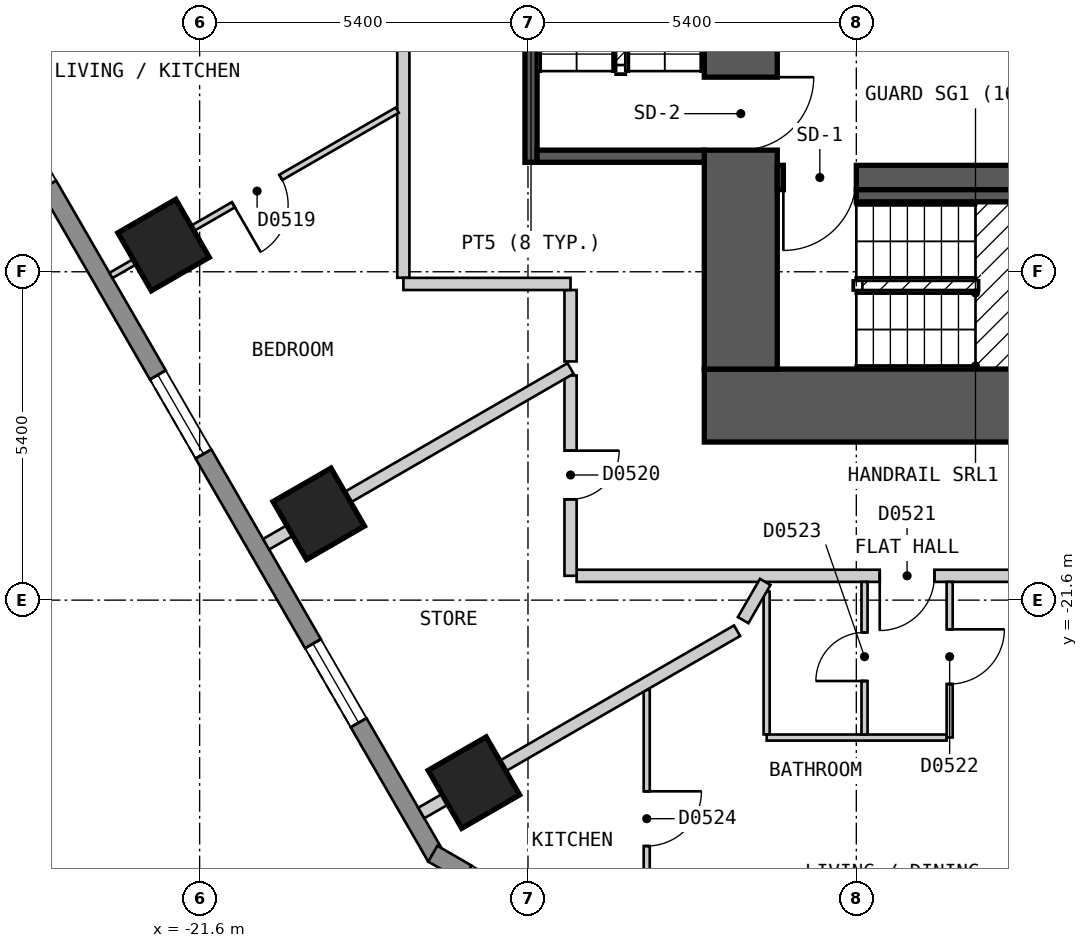
"""IFC4 building model, lengths in metres.
Left out: names, types, materials, properties, quantities, classifications, styles, units other than length and angle.
Written with IfcOpenShell. Run it as: python <this file> out.ifc"""

import sys

from ifc_helpers import new_model, si_unit, direction, frame, frame_2d, origin, origin_2d, place, context, subcontext, project, spatial, polyline, rectangle, outline, extrude, element, fill, save


model = new_model("IFC4")
c1 = context("Model", 3, precision=1e-05, world=origin(), true_north=direction((0.0, 1.0)))
c2 = subcontext(c1, "Body", "Model", "MODEL_VIEW")
j1 = project(units=[si_unit("LENGTHUNIT", "METRE"), si_unit("PLANEANGLEUNIT", "RADIAN")], contexts=[c1])
p1 = place(None, origin())
s1 = spatial("IfcSite", under=j1, at=p1, CompositionType="ELEMENT")
p2 = place(p1, origin())
s2 = spatial("IfcBuilding", under=s1, at=p2, CompositionType="ELEMENT")
p3 = place(p2, frame((0.0, 0.0, 56.4)))
s3 = spatial("IfcBuildingStorey", under=s2, at=p3, CompositionType="ELEMENT", Elevation=56.4)
for number, where, z_axis, x_axis in (
    (1, (-22.193, -15.761, 0.0), (0.0, 0.0, 1.0), (0.5, -0.866, 0.0)),
    (2, (-19.641, -20.181, 0.0), (0.0, 0.0, 1.0), (0.5, -0.866, 0.0)),
    (3, (-17.089, -24.601, 0.0), (0.0, 0.0, 1.0), (0.5, -0.866, 0.0)),
):
    element("IfcColumn", number, at=place(p3, frame(where, z_axis=z_axis, x_axis=x_axis)), inside=s3, PredefinedType="COLUMN", context=c2, shape_type="SweptSolid", body=[
        extrude(rectangle(XDim=1.1, YDim=1.1, at=origin_2d()), origin(), (0.0, 0.0, 1.0), 3.0),
    ])
p4 = place(p3, frame((-13.3, -18.4, 0.0), z_axis=(0.0, 0.0, 1.0), x_axis=(1.0, 0.0, 0.0)))
e4 = element("IfcWall", 4, at=p4, inside=s3, PredefinedType="SHEAR", context=c2, shape_type="SweptSolid", body=[
    extrude(rectangle(XDim=26.6, YDim=1.2, at=frame_2d((13.3, 0.0))), origin(), (0.0, 0.0, 1.0), 2.7),
])
p5 = place(p3, frame((-12.7, -17.8, 0.0), z_axis=(0.0, 0.0, 1.0), x_axis=(0.0, 1.0, 0.0)))
e5 = element("IfcWall", 5, at=p5, inside=s3, PredefinedType="SHEAR", context=c2, shape_type="SweptSolid", body=[
    extrude(rectangle(XDim=11.6, YDim=1.2, at=frame_2d((5.8, 0.0))), origin(), (0.0, 0.0, 1.0), 2.7),
])
p6 = place(p5, frame((3.6, 0.0, 0.0)))
e6 = element("IfcOpeningElement", 6, at=p6, cuts=e5, PredefinedType="OPENING", context=c2, shape_type="SweptSolid", body=[
    extrude(rectangle(XDim=1.2, YDim=2.1, at=frame_2d((0.6, 1.05))), frame((0.0, 0.61, 0.0), z_axis=(0.0, -1.0, 0.0), x_axis=(1.0, 0.0, 0.0)), (0.0, 0.0, 1.0), 1.22),
])
p7 = place(p3, frame((-12.1, -14.65, 0.0), z_axis=(0.0, 0.0, 1.0), x_axis=(1.0, 0.0, 0.0)))
e7 = element("IfcWall", 7, at=p7, inside=s3, PredefinedType="SHEAR", context=c2, shape_type="SweptSolid", body=[
    extrude(rectangle(XDim=24.2, YDim=0.4, at=frame_2d((12.1, 0.0))), origin(), (0.0, 0.0, 1.0), 2.7),
])
p8 = place(p7, frame((1.3, 0.0, 0.0), z_axis=(0.0, 0.0, 1.0), x_axis=(-1.0, 0.0, 0.0)))
e8 = element("IfcOpeningElement", 8, at=p8, cuts=e7, PredefinedType="OPENING", context=c2, shape_type="SweptSolid", body=[
    extrude(rectangle(XDim=1.2, YDim=2.1, at=frame_2d((0.6, 1.05))), frame((0.0, 0.21, 0.0), z_axis=(0.0, -1.0, 0.0), x_axis=(1.0, 0.0, 0.0)), (0.0, 0.0, 1.0), 0.42),
])
p9 = place(p7, frame((24.15, 0.0, 0.0), z_axis=(0.0, 0.0, 1.0), x_axis=(-1.0, 0.0, 0.0)))
e9 = element("IfcOpeningElement", 9, at=p9, cuts=e7, PredefinedType="OPENING", context=c2, shape_type="SweptSolid", body=[
    extrude(rectangle(XDim=1.2, YDim=2.1, at=frame_2d((0.6, 1.05))), frame((0.0, 0.21, 0.0), z_axis=(0.0, -1.0, 0.0), x_axis=(1.0, 0.0, 0.0)), (0.0, 0.0, 1.0), 0.42),
])
p10 = place(p7, frame((16.6, 0.0, 0.0), z_axis=(0.0, 0.0, 1.0), x_axis=(-1.0, 0.0, 0.0)))
e10 = element("IfcOpeningElement", 10, at=p10, cuts=e7, PredefinedType="OPENING", context=c2, shape_type="SweptSolid", body=[
    extrude(rectangle(XDim=1.0, YDim=2.1, at=frame_2d((0.5, 1.05))), frame((0.0, 0.21, 0.0), z_axis=(0.0, -1.0, 0.0), x_axis=(1.0, 0.0, 0.0)), (0.0, 0.0, 1.0), 0.42),
])
p11 = place(p7, frame((18.35, 0.0, 0.0), z_axis=(0.0, 0.0, 1.0), x_axis=(-1.0, 0.0, 0.0)))
e11 = element("IfcOpeningElement", 11, at=p11, cuts=e7, PredefinedType="OPENING", context=c2, shape_type="SweptSolid", body=[
    extrude(rectangle(XDim=0.9, YDim=2.1, at=frame_2d((0.45, 1.05))), frame((0.0, 0.21, 0.0), z_axis=(0.0, -1.0, 0.0), x_axis=(1.0, 0.0, 0.0)), (0.0, 0.0, 1.0), 0.42),
])
p12 = place(p3, frame((-31.22, -2.425, 0.0), z_axis=(0.0, 0.0, 1.0), x_axis=(0.500001938803, -0.866024284413, 0.0)))
e12 = element("IfcWall", 12, at=p12, inside=s3, PredefinedType="SOLIDWALL", context=c2, shape_type="SweptSolid", body=[
    extrude(outline(polyline([(0.0, -0.15), (27.02, -0.15), (26.94, 0.15), (0.08, 0.15), (0.0, -0.15)])), origin(), (0.0, 0.0, 1.0), 2.7),
])
p13 = place(p12, frame((2.553, 0.0, 0.15)))
e13 = element("IfcOpeningElement", 13, at=p13, cuts=e12, PredefinedType="OPENING", context=c2, shape_type="SweptSolid", body=[
    extrude(rectangle(XDim=1.5, YDim=2.1, at=frame_2d((0.75, 1.05))), frame((0.0, 0.16, 0.0), z_axis=(0.0, -1.0, 0.0), x_axis=(1.0, 0.0, 0.0)), (0.0, 0.0, 1.0), 0.32),
])
p14 = place(p12, frame((7.657, 0.0, 0.15)))
e14 = element("IfcOpeningElement", 14, at=p14, cuts=e12, PredefinedType="OPENING", context=c2, shape_type="SweptSolid", body=[
    extrude(rectangle(XDim=1.5, YDim=2.1, at=frame_2d((0.75, 1.05))), frame((0.0, 0.16, 0.0), z_axis=(0.0, -1.0, 0.0), x_axis=(1.0, 0.0, 0.0)), (0.0, 0.0, 1.0), 0.32),
])
p15 = place(p12, frame((12.761, 0.0, 0.15)))
e15 = element("IfcOpeningElement", 15, at=p15, cuts=e12, PredefinedType="OPENING", context=c2, shape_type="SweptSolid", body=[
    extrude(rectangle(XDim=1.5, YDim=2.1, at=frame_2d((0.75, 1.05))), frame((0.0, 0.16, 0.0), z_axis=(0.0, -1.0, 0.0), x_axis=(1.0, 0.0, 0.0)), (0.0, 0.0, 1.0), 0.32),
])
p16 = place(p12, frame((17.865, 0.0, 0.15)))
e16 = element("IfcOpeningElement", 16, at=p16, cuts=e12, PredefinedType="OPENING", context=c2, shape_type="SweptSolid", body=[
    extrude(rectangle(XDim=1.5, YDim=2.1, at=frame_2d((0.75, 1.05))), frame((0.0, 0.16, 0.0), z_axis=(0.0, -1.0, 0.0), x_axis=(1.0, 0.0, 0.0)), (0.0, 0.0, 1.0), 0.32),
])
p17 = place(p12, frame((22.969, 0.0, 0.15)))
e17 = element("IfcOpeningElement", 17, at=p17, cuts=e12, PredefinedType="OPENING", context=c2, shape_type="SweptSolid", body=[
    extrude(rectangle(XDim=1.5, YDim=2.1, at=frame_2d((0.75, 1.05))), frame((0.0, 0.16, 0.0), z_axis=(0.0, -1.0, 0.0), x_axis=(1.0, 0.0, 0.0)), (0.0, 0.0, 1.0), 0.32),
])
p18 = place(p3, frame((-17.765, -25.77, 0.0), z_axis=(0.0, 0.0, 1.0), x_axis=(0.866010750942, -0.50002537861, 0.0)))
e18 = element("IfcWall", 18, at=p18, inside=s3, PredefinedType="SOLIDWALL", context=c2, shape_type="SweptSolid", body=[
    extrude(outline(polyline([(0.0, -0.15), (5.0, -0.15), (4.919, 0.15), (0.08, 0.15), (0.0, -0.15)])), origin(), (0.0, 0.0, 1.0), 2.7),
])
p19 = place(p18, frame((0.65, 0.0, 0.15)))
e19 = element("IfcOpeningElement", 19, at=p19, cuts=e18, PredefinedType="OPENING", context=c2, shape_type="SweptSolid", body=[
    extrude(rectangle(XDim=1.2, YDim=2.1, at=frame_2d((0.6, 1.05))), frame((0.0, 0.16, 0.0), z_axis=(0.0, -1.0, 0.0), x_axis=(1.0, 0.0, 0.0)), (0.0, 0.0, 1.0), 0.32),
])
p20 = place(p3, frame((-15.5, -16.5, 0.0), z_axis=(0.0, 0.0, 1.0), x_axis=(0.0, -1.0, 0.0)))
e20 = element("IfcWall", 20, at=p20, inside=s3, PredefinedType="PARTITIONING", context=c2, shape_type="SweptSolid", body=[
    extrude(rectangle(XDim=1.175, YDim=0.2, at=frame_2d((0.587, 0.0))), origin(), (0.0, 0.0, 1.0), 2.7),
])
p21 = place(p3, frame((-18.25, -11.507, 0.0), z_axis=(0.0, 0.0, 1.0), x_axis=(0.0, -1.0, 0.0)))
e21 = element("IfcWall", 21, at=p21, inside=s3, PredefinedType="PARTITIONING", context=c2, shape_type="SweptSolid", body=[
    extrude(rectangle(XDim=4.792, YDim=0.2, at=frame_2d((2.396, 0.0))), origin(), (0.0, 0.0, 1.0), 2.7),
])
p22 = place(p3, frame((-18.249, -16.4, 0.0), z_axis=(0.0, 0.0, 1.0), x_axis=(1.0, 0.0, 0.0)))
e22 = element("IfcWall", 22, at=p22, inside=s3, PredefinedType="PARTITIONING", context=c2, shape_type="SweptSolid", body=[
    extrude(rectangle(XDim=2.749, YDim=0.2, at=frame_2d((1.375, 0.0))), origin(), (0.0, 0.0, 1.0), 2.7),
])
p23 = place(p3, frame((-15.4, -21.2, 0.0), z_axis=(0.0, 0.0, 1.0), x_axis=(1.0, 0.0, 0.0)))
e23 = element("IfcWall", 23, at=p23, inside=s3, PredefinedType="PARTITIONING", context=c2, shape_type="SweptSolid", body=[
    extrude(rectangle(XDim=30.799, YDim=0.2, at=frame_2d((15.399, 0.0))), origin(), (0.0, 0.0, 1.0), 2.7),
])
p24 = place(p23, frame((4.985, 0.0, 0.0)))
e24 = element("IfcOpeningElement", 24, at=p24, cuts=e23, PredefinedType="OPENING", context=c2, shape_type="SweptSolid", body=[
    extrude(rectangle(XDim=0.9, YDim=2.1, at=frame_2d((0.45, 1.05))), frame((0.0, 0.11, 0.0), z_axis=(0.0, -1.0, 0.0), x_axis=(1.0, 0.0, 0.0)), (0.0, 0.0, 1.0), 0.22),
])
p25 = place(p23, frame((20.005, 0.0, 0.0)))
e25 = element("IfcOpeningElement", 25, at=p25, cuts=e23, PredefinedType="OPENING", context=c2, shape_type="SweptSolid", body=[
    extrude(rectangle(XDim=1.0, YDim=2.1, at=frame_2d((0.5, 1.05))), frame((0.0, 0.11, 0.0), z_axis=(0.0, -1.0, 0.0), x_axis=(1.0, 0.0, 0.0)), (0.0, 0.0, 1.0), 0.22),
])
p26 = place(p23, frame((24.916, 0.0, 0.0)))
e26 = element("IfcOpeningElement", 26, at=p26, cuts=e23, PredefinedType="OPENING", context=c2, shape_type="SweptSolid", body=[
    extrude(rectangle(XDim=0.9, YDim=2.1, at=frame_2d((0.45, 1.05))), frame((0.0, 0.11, 0.0), z_axis=(0.0, -1.0, 0.0), x_axis=(1.0, 0.0, 0.0)), (0.0, 0.0, 1.0), 0.22),
])
p27 = place(p3, frame((-15.5, -21.2, 0.0), z_axis=(0.0, 0.0, 1.0), x_axis=(0.0, 1.0, 0.0)))
e27 = element("IfcWall", 27, at=p27, inside=s3, PredefinedType="PARTITIONING", context=c2, shape_type="SweptSolid", body=[
    extrude(rectangle(XDim=3.294, YDim=0.2, at=frame_2d((1.647, 0.0))), origin(), (0.0, 0.0, 1.0), 2.7),
])
p28 = place(p27, frame((1.258, 0.0, 0.0)))
e28 = element("IfcOpeningElement", 28, at=p28, cuts=e27, PredefinedType="OPENING", context=c2, shape_type="SweptSolid", body=[
    extrude(rectangle(XDim=0.8, YDim=2.1, at=frame_2d((0.4, 1.05))), frame((0.0, 0.11, 0.0), z_axis=(0.0, -1.0, 0.0), x_axis=(1.0, 0.0, 0.0)), (0.0, 0.0, 1.0), 0.22),
])
p29 = place(p3, frame((-12.275, -21.46, 0.0), z_axis=(0.0, 0.0, 1.0), x_axis=(0.0, -1.0, 0.0)))
e29 = element("IfcWall", 29, at=p29, inside=s3, PredefinedType="PARTITIONING", context=c2, shape_type="SweptSolid", body=[
    extrude(rectangle(XDim=2.349, YDim=0.1, at=frame_2d((1.175, 0.0))), origin(), (0.0, 0.0, 1.0), 2.7),
])
p30 = place(p3, frame((-12.274, -23.86, 0.0), z_axis=(0.0, 0.0, 1.0), x_axis=(1.0, 0.0, 0.0)))
e30 = element("IfcWall", 30, at=p30, inside=s3, PredefinedType="PARTITIONING", context=c2, shape_type="SweptSolid", body=[
    extrude(rectangle(XDim=2.958, YDim=0.1, at=frame_2d((1.479, 0.0))), origin(), (0.0, 0.0, 1.0), 2.7),
])
p31 = place(p3, frame((-9.265, -23.859, 0.0), z_axis=(0.0, 0.0, 1.0), x_axis=(0.0, 1.0, 0.0)))
e31 = element("IfcWall", 31, at=p31, inside=s3, PredefinedType="PARTITIONING", context=c2, shape_type="SweptSolid", body=[
    extrude(rectangle(XDim=2.559, YDim=0.1, at=frame_2d((1.279, 0.0))), origin(), (0.0, 0.0, 1.0), 2.7),
])
p32 = place(p31, frame((0.879, 0.0, 0.0)))
e32 = element("IfcOpeningElement", 32, at=p32, cuts=e31, PredefinedType="OPENING", context=c2, shape_type="SweptSolid", body=[
    extrude(rectangle(XDim=0.9, YDim=2.1, at=frame_2d((0.45, 1.05))), frame((0.0, 0.06, 0.0), z_axis=(0.0, -1.0, 0.0), x_axis=(1.0, 0.0, 0.0)), (0.0, 0.0, 1.0), 0.12),
])
p33 = place(p3, frame((-10.665, -23.81, 0.0), z_axis=(0.0, 0.0, 1.0), x_axis=(0.0, 1.0, 0.0)))
e33 = element("IfcWall", 33, at=p33, inside=s3, PredefinedType="PARTITIONING", context=c2, shape_type="SweptSolid", body=[
    extrude(rectangle(XDim=2.51, YDim=0.1, at=frame_2d((1.255, 0.0))), origin(), (0.0, 0.0, 1.0), 2.7),
])
p34 = place(p33, frame((0.88, 0.0, 0.0)))
e34 = element("IfcOpeningElement", 34, at=p34, cuts=e33, PredefinedType="OPENING", context=c2, shape_type="SweptSolid", body=[
    extrude(rectangle(XDim=0.8, YDim=2.1, at=frame_2d((0.4, 1.05))), frame((0.0, 0.06, 0.0), z_axis=(0.0, -1.0, 0.0), x_axis=(1.0, 0.0, 0.0)), (0.0, 0.0, 1.0), 0.12),
])
p35 = place(p3, frame((-14.247, -27.628, 0.0), z_axis=(0.0, 0.0, 1.0), x_axis=(0.0, 1.0, 0.0)))
e35 = element("IfcWall", 35, at=p35, inside=s3, PredefinedType="PARTITIONING", context=c2, shape_type="SweptSolid", body=[
    extrude(rectangle(XDim=4.552, YDim=0.1, at=frame_2d((2.276, 0.0))), origin(), (0.0, 0.0, 1.0), 2.7),
])
p36 = place(p35, frame((1.984, 0.0, 0.0)))
e36 = element("IfcOpeningElement", 36, at=p36, cuts=e35, PredefinedType="OPENING", context=c2, shape_type="SweptSolid", body=[
    extrude(rectangle(XDim=0.9, YDim=2.1, at=frame_2d((0.45, 1.05))), frame((0.0, 0.06, 0.0), z_axis=(0.0, -1.0, 0.0), x_axis=(1.0, 0.0, 0.0)), (0.0, 0.0, 1.0), 0.12),
])
p37 = place(p3, frame((-23.059, -16.261, 0.0), z_axis=(0.0, 0.0, 1.0), x_axis=(0.866004639177, 0.500035963631, 0.0)))
e37 = element("IfcWall", 37, at=p37, inside=s3, PredefinedType="PARTITIONING", context=c2, shape_type="SweptSolid", body=[
    extrude(rectangle(XDim=5.438, YDim=0.1, at=frame_2d((2.719, 0.0))), origin(), (0.0, 0.0, 1.0), 2.7),
])
p38 = place(p37, frame((2.326, 0.0, 0.0)))
e38 = element("IfcOpeningElement", 38, at=p38, cuts=e37, PredefinedType="OPENING", context=c2, shape_type="SweptSolid", body=[
    extrude(rectangle(XDim=0.9, YDim=2.1, at=frame_2d((0.45, 1.05))), frame((0.0, 0.06, 0.0), z_axis=(0.0, -1.0, 0.0), x_axis=(1.0, 0.0, 0.0)), (0.0, 0.0, 1.0), 0.12),
])
p39 = place(p3, frame((-12.661, -21.929, 0.0), z_axis=(0.0, 0.0, 1.0), x_axis=(0.499683639304, 0.866207977689, 0.0)))
e39 = element("IfcWall", 39, at=p39, inside=s3, PredefinedType="PARTITIONING", context=c2, shape_type="SweptSolid", body=[
    extrude(rectangle(XDim=0.726, YDim=0.2, at=frame_2d((0.363, 0.0))), origin(), (0.0, 0.0, 1.0), 2.7),
])
p40 = place(p3, frame((-20.507, -20.681, 0.0), z_axis=(0.0, 0.0, 1.0), x_axis=(0.86602314875, 0.500003905814, 0.0)))
e40 = element("IfcWall", 40, at=p40, inside=s3, PredefinedType="PARTITIONING", context=c2, shape_type="SweptSolid", body=[
    extrude(rectangle(XDim=5.782, YDim=0.2, at=frame_2d((2.891, 0.0))), origin(), (0.0, 0.0, 1.0), 2.7),
])
p41 = place(p3, frame((-17.955, -25.101, 0.0), z_axis=(0.0, 0.0, 1.0), x_axis=(0.866080519133, 0.499904525262, 0.0)))
e41 = element("IfcWall", 41, at=p41, inside=s3, PredefinedType="PARTITIONING", context=c2, shape_type="SweptSolid", body=[
    extrude(rectangle(XDim=5.997, YDim=0.2, at=frame_2d((2.999, 0.0))), origin(), (0.0, 0.0, 1.0), 2.7),
])
p42 = place(p3, frame((-16.15, -14.4, 0.0), z_axis=(0.0, 0.0, 1.0), x_axis=(0.0, 1.0, 0.0)))
e42 = element("IfcWall", 42, at=p42, inside=s3, PredefinedType="SOLIDWALL", context=c2, shape_type="SweptSolid", body=[
    extrude(rectangle(XDim=5.8, YDim=0.2, at=frame_2d((2.9, 0.0))), origin(), (0.0, 0.0, 1.0), 2.7),
])
p43 = place(p3, frame((-16.05, -14.3, 0.0), z_axis=(0.0, 0.0, 1.0), x_axis=(1.0, 0.0, 0.0)))
e43 = element("IfcWall", 43, at=p43, inside=s3, PredefinedType="SOLIDWALL", context=c2, shape_type="SweptSolid", body=[
    extrude(rectangle(XDim=2.75, YDim=0.2, at=frame_2d((1.375, 0.0))), origin(), (0.0, 0.0, 1.0), 2.7),
])
p44 = place(p3, frame((-10.8, -14.95, 0.0), z_axis=(0.0, 0.0, 1.0), x_axis=(1.0, 0.0, 0.0)))
e44 = element("IfcWall", 44, at=p44, inside=s3, PredefinedType="SOLIDWALL", context=c2, shape_type="SweptSolid", body=[
    extrude(rectangle(XDim=4.1, YDim=0.2, at=frame_2d((2.05, 0.0))), origin(), (0.0, 0.0, 1.0), 2.7),
])
p45 = place(p16, origin())
e45 = element("IfcWindow", 45, at=p45, inside=s3, PartitioningType="SINGLE_PANEL", PredefinedType="WINDOW", context=c2, shape_type="SweptSolid", body=[
    extrude(rectangle(XDim=1.5, YDim=2.1, at=frame_2d((0.75, 1.05))), frame((0.0, 0.03, 0.0), z_axis=(0.0, -1.0, 0.0), x_axis=(1.0, 0.0, 0.0)), (0.0, 0.0, 1.0), 0.06),
])
fill(e16, e45)
p46 = place(p17, origin())
e46 = element("IfcWindow", 46, at=p46, inside=s3, PartitioningType="SINGLE_PANEL", PredefinedType="WINDOW", context=c2, shape_type="SweptSolid", body=[
    extrude(rectangle(XDim=1.5, YDim=2.1, at=frame_2d((0.75, 1.05))), frame((0.0, 0.03, 0.0), z_axis=(0.0, -1.0, 0.0), x_axis=(1.0, 0.0, 0.0)), (0.0, 0.0, 1.0), 0.06),
])
fill(e17, e46)
p47 = place(p38, origin())
e47 = element("IfcDoor", 47, at=p47, inside=s3, OperationType="SINGLE_SWING_LEFT", PredefinedType="DOOR", context=c2, shape_type="SweptSolid", body=[
    extrude(rectangle(XDim=0.9, YDim=2.1, at=frame_2d((0.45, 1.05))), frame((0.0, 0.025, 0.0), z_axis=(0.0, -1.0, 0.0), x_axis=(1.0, 0.0, 0.0)), (0.0, 0.0, 1.0), 0.05),
])
fill(e38, e47)
p48 = place(p28, origin())
e48 = element("IfcDoor", 48, at=p48, inside=s3, OperationType="SINGLE_SWING_RIGHT", PredefinedType="DOOR", context=c2, shape_type="SweptSolid", body=[
    extrude(rectangle(XDim=0.8, YDim=2.1, at=frame_2d((0.4, 1.05))), frame((0.0, 0.025, 0.0), z_axis=(0.0, -1.0, 0.0), x_axis=(1.0, 0.0, 0.0)), (0.0, 0.0, 1.0), 0.05),
])
fill(e28, e48)
p49 = place(p24, origin())
e49 = element("IfcDoor", 49, at=p49, inside=s3, OperationType="SINGLE_SWING_LEFT", PredefinedType="DOOR", context=c2, shape_type="SweptSolid", body=[
    extrude(rectangle(XDim=0.9, YDim=2.1, at=frame_2d((0.45, 1.05))), frame((0.0, 0.025, 0.0), z_axis=(0.0, -1.0, 0.0), x_axis=(1.0, 0.0, 0.0)), (0.0, 0.0, 1.0), 0.05),
])
fill(e24, e49)
p50 = place(p32, origin())
e50 = element("IfcDoor", 50, at=p50, inside=s3, OperationType="SINGLE_SWING_RIGHT", PredefinedType="DOOR", context=c2, shape_type="SweptSolid", body=[
    extrude(rectangle(XDim=0.9, YDim=2.1, at=frame_2d((0.45, 1.05))), frame((0.0, 0.025, 0.0), z_axis=(0.0, -1.0, 0.0), x_axis=(1.0, 0.0, 0.0)), (0.0, 0.0, 1.0), 0.05),
])
fill(e32, e50)
p51 = place(p34, origin())
e51 = element("IfcDoor", 51, at=p51, inside=s3, OperationType="SINGLE_SWING_LEFT", PredefinedType="DOOR", context=c2, shape_type="SweptSolid", body=[
    extrude(rectangle(XDim=0.8, YDim=2.1, at=frame_2d((0.4, 1.05))), frame((0.0, 0.025, 0.0), z_axis=(0.0, -1.0, 0.0), x_axis=(1.0, 0.0, 0.0)), (0.0, 0.0, 1.0), 0.05),
])
fill(e34, e51)
p52 = place(p36, origin())
e52 = element("IfcDoor", 52, at=p52, inside=s3, OperationType="SINGLE_SWING_RIGHT", PredefinedType="DOOR", context=c2, shape_type="SweptSolid", body=[
    extrude(rectangle(XDim=0.9, YDim=2.1, at=frame_2d((0.45, 1.05))), frame((0.0, 0.025, 0.0), z_axis=(0.0, -1.0, 0.0), x_axis=(1.0, 0.0, 0.0)), (0.0, 0.0, 1.0), 0.05),
])
fill(e36, e52)
p53 = place(p8, origin())
e53 = element("IfcDoor", 53, at=p53, inside=s3, OperationType="SINGLE_SWING_RIGHT", PredefinedType="DOOR", context=c2, shape_type="SweptSolid", body=[
    extrude(rectangle(XDim=1.2, YDim=2.1, at=frame_2d((0.6, 1.05))), frame((0.0, 0.025, 0.0), z_axis=(0.0, -1.0, 0.0), x_axis=(1.0, 0.0, 0.0)), (0.0, 0.0, 1.0), 0.05),
])
fill(e8, e53)
p54 = place(p6, origin())
e54 = element("IfcDoor", 54, at=p54, inside=s3, OperationType="SINGLE_SWING_RIGHT", PredefinedType="DOOR", context=c2, shape_type="SweptSolid", body=[
    extrude(rectangle(XDim=1.2, YDim=2.1, at=frame_2d((0.6, 1.05))), frame((0.0, 0.025, 0.0), z_axis=(0.0, -1.0, 0.0), x_axis=(1.0, 0.0, 0.0)), (0.0, 0.0, 1.0), 0.05),
])
fill(e6, e54)
save(model, sys.argv[1])
